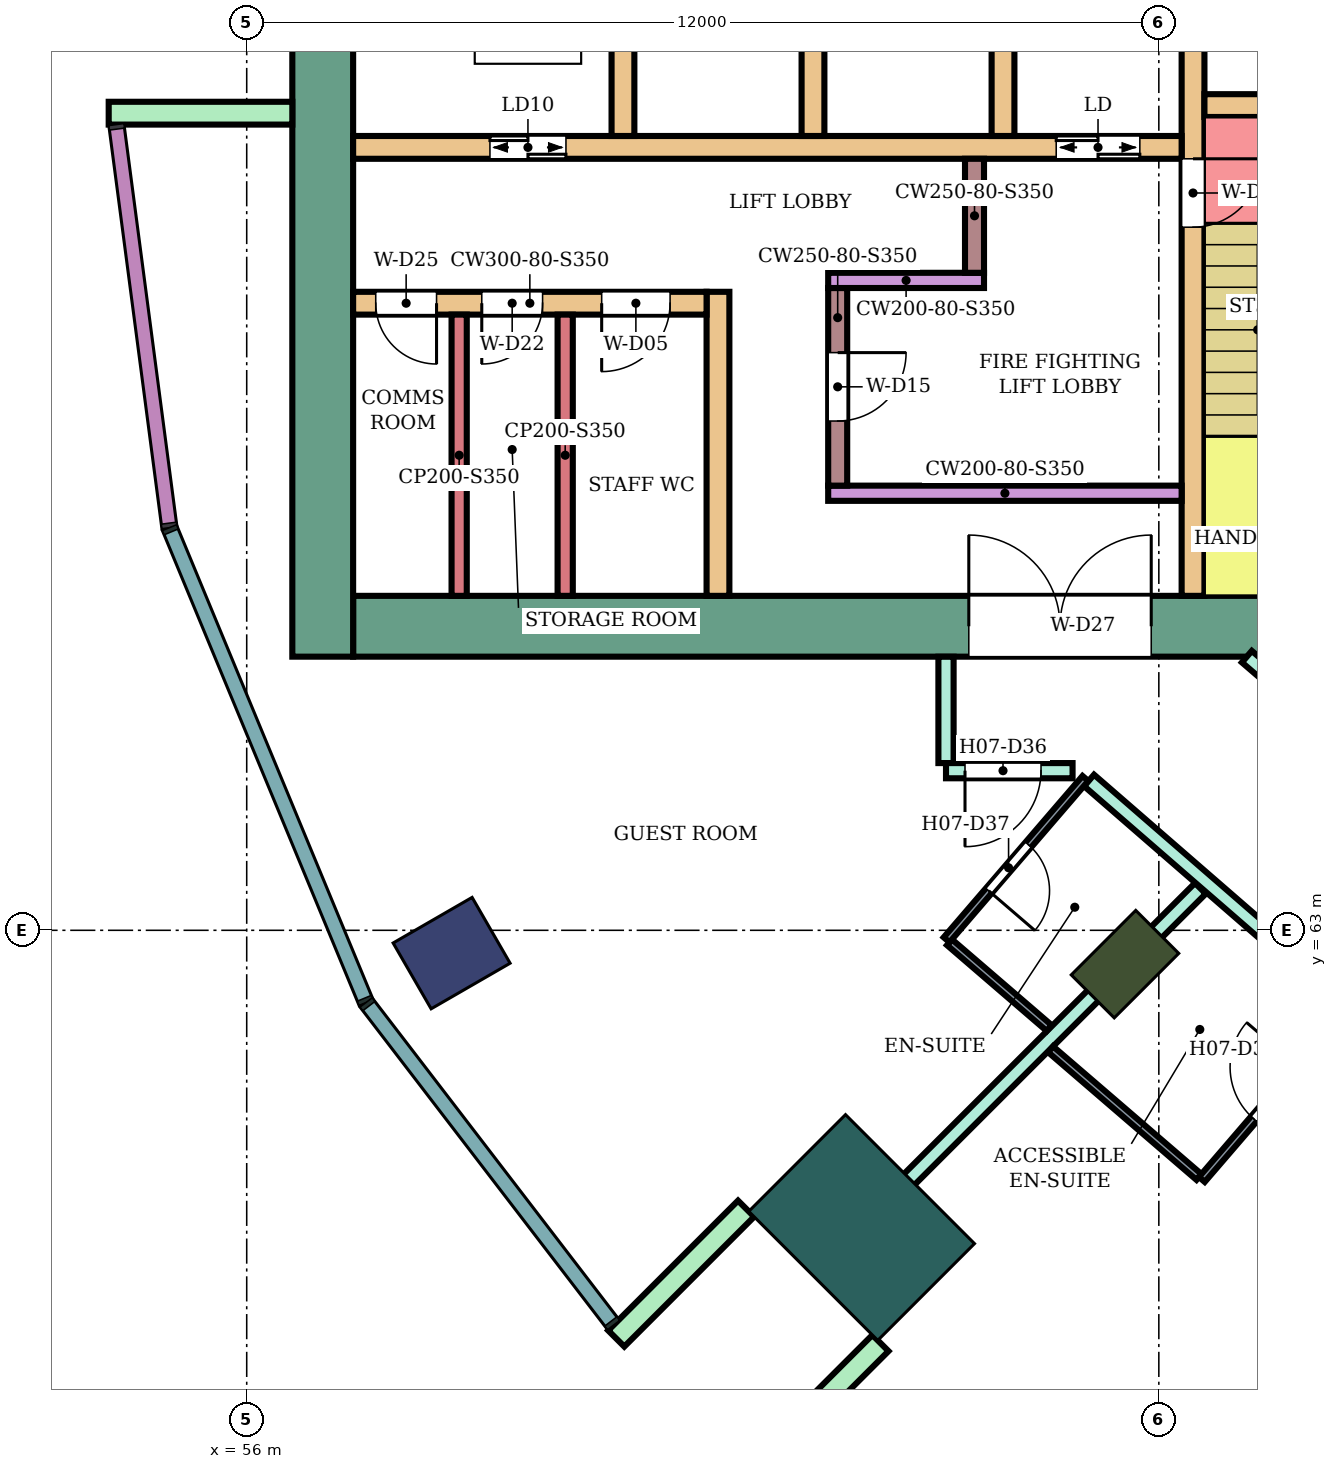
"""IFC4 building model, lengths in metres.
Left out: names, types, materials, properties, quantities, classifications, styles, units other than length and angle.
Written with IfcOpenShell. Run it as: python <this file> out.ifc"""

import sys

from ifc_helpers import new_model, si_unit, direction, frame, frame_2d, origin, origin_2d, place, context, subcontext, project, spatial, rectangle, extrude, element, fill, save


model = new_model("IFC4")
c1 = context("Model", 3, precision=1e-05, world=origin(), true_north=direction((0.0, 1.0)))
c2 = subcontext(c1, "Body", "Model", "MODEL_VIEW")
j1 = project(units=[si_unit("LENGTHUNIT", "METRE"), si_unit("PLANEANGLEUNIT", "RADIAN")], contexts=[c1])
p1 = place(None, origin())
s1 = spatial("IfcSite", under=j1, at=p1, CompositionType="ELEMENT")
p2 = place(p1, origin())
s2 = spatial("IfcBuilding", under=s1, at=p2, CompositionType="ELEMENT")
p3 = place(p2, frame((0.0, 0.0, 105.2)))
s3 = spatial("IfcBuildingStorey", under=s2, at=p3, CompositionType="ELEMENT", Elevation=105.2)
p4 = place(p3, frame((58.696, 62.7, 0.0), z_axis=(0.0, 0.0, 1.0), x_axis=(-0.866025403784, -0.5, 0.0)))
e1 = element("IfcColumn", 1, at=p4, inside=s3, PredefinedType="COLUMN", context=c2, shape_type="SweptSolid", body=[
    extrude(rectangle(XDim=1.2, YDim=1.0, at=origin_2d()), origin(), (0.0, 0.0, 1.0), 3.8),
])
p5 = place(p3, frame((67.555, 62.555, 0.0), z_axis=(0.0, 0.0, 1.0), x_axis=(-0.707106781187, -0.707106781187, 0.0)))
e2 = element("IfcColumn", 2, at=p5, inside=s3, PredefinedType="COLUMN", context=c2, shape_type="SweptSolid", body=[
    extrude(rectangle(XDim=1.2, YDim=0.8, at=origin_2d()), origin(), (0.0, 0.0, 1.0), 3.8),
])
p6 = place(p3, frame((64.09, 59.09, 0.0), z_axis=(0.0, 0.0, 1.0), x_axis=(-0.707106781187, -0.707106781187, 0.0)))
e3 = element("IfcColumn", 3, at=p6, inside=s3, PredefinedType="COLUMN", context=c2, shape_type="SweptSolid", body=[
    extrude(rectangle(XDim=1.8, YDim=2.4, at=origin_2d()), origin(), (0.0, 0.0, 1.0), 3.8),
])
p7 = place(p3, frame((72.1, 67.0, 0.0), z_axis=(0.0, 0.0, 1.0), x_axis=(-1.0, 0.0, 0.0)))
e4 = element("IfcWall", 4, at=p7, inside=s3, PredefinedType="SHEAR", context=c2, shape_type="SweptSolid", body=[
    extrude(rectangle(XDim=14.7, YDim=0.8, at=frame_2d((7.35, 0.0))), origin(), (0.0, 0.0, 1.0), 3.45),
])
p8 = place(p7, frame((4.2, 0.0, 0.0)))
e5 = element("IfcOpeningElement", 5, at=p8, cuts=e4, PredefinedType="OPENING", context=c2, shape_type="SweptSolid", body=[
    extrude(rectangle(XDim=2.4, YDim=2.4, at=frame_2d((1.2, 1.2))), frame((0.0, 0.41, 0.0), z_axis=(0.0, -1.0, 0.0), x_axis=(1.0, 0.0, 0.0)), (0.0, 0.0, 1.0), 0.82),
])
p9 = place(p3, frame((57.0, 83.4, 0.0), z_axis=(0.0, 0.0, 1.0), x_axis=(0.0, -1.0, 0.0)))
e6 = element("IfcWall", 6, at=p9, inside=s3, PredefinedType="SHEAR", context=c2, shape_type="SweptSolid", body=[
    extrude(rectangle(XDim=16.8, YDim=0.8, at=frame_2d((8.4, 0.0))), origin(), (0.0, 0.0, 1.0), 3.45),
])
p10 = place(p3, frame((68.45, 75.0, 0.0), z_axis=(0.0, 0.0, 1.0), x_axis=(0.0, -1.0, 0.0)))
e7 = element("IfcWall", 7, at=p10, inside=s3, PredefinedType="SHEAR", context=c2, shape_type="SweptSolid", body=[
    extrude(rectangle(XDim=7.6, YDim=0.3, at=frame_2d((3.8, 0.0))), origin(), (0.0, 0.0, 1.0), 3.45),
])
p11 = place(p10, frame((1.85, 0.0, 0.0)))
e8 = element("IfcOpeningElement", 8, at=p11, cuts=e7, PredefinedType="OPENING", context=c2, shape_type="SweptSolid", body=[
    extrude(rectangle(XDim=0.9, YDim=2.1, at=frame_2d((0.45, 1.05))), frame((0.0, 0.16, 0.0), z_axis=(0.0, -1.0, 0.0), x_axis=(1.0, 0.0, 0.0)), (0.0, 0.0, 1.0), 0.32),
])
p12 = place(p3, frame((71.65, 73.85, 0.0), z_axis=(0.0, 0.0, 1.0), x_axis=(-1.0, 0.0, 0.0)))
e9 = element("IfcWall", 9, at=p12, inside=s3, PredefinedType="SHEAR", context=c2, shape_type="SweptSolid", body=[
    extrude(rectangle(XDim=3.05, YDim=0.3, at=frame_2d((1.525, 0.0))), origin(), (0.0, 0.0, 1.0), 3.45),
])
p13 = place(p12, frame((1.1, 0.0, 0.0)))
e10 = element("IfcOpeningElement", 10, at=p13, cuts=e9, PredefinedType="OPENING", context=c2, shape_type="SweptSolid", body=[
    extrude(rectangle(XDim=0.7, YDim=2.0, at=frame_2d((0.35, 1.0))), frame((0.0, 0.16, 0.0), z_axis=(0.0, -1.0, 0.0), x_axis=(1.0, 0.0, 0.0)), (0.0, 0.0, 1.0), 0.32),
])
p14 = place(p3, frame((68.3, 73.3, 0.0), z_axis=(0.0, 0.0, 1.0), x_axis=(-1.0, 0.0, 0.0)))
e11 = element("IfcWall", 11, at=p14, inside=s3, PredefinedType="SHEAR", context=c2, shape_type="SweptSolid", body=[
    extrude(rectangle(XDim=10.9, YDim=0.3, at=frame_2d((5.45, 0.0))), origin(), (0.0, 0.0, 1.0), 3.45),
])
p15 = place(p14, frame((0.55, 0.0, 0.0)))
e12 = element("IfcOpeningElement", 12, at=p15, cuts=e11, PredefinedType="OPENING", context=c2, shape_type="SweptSolid", body=[
    extrude(rectangle(XDim=1.1, YDim=2.1, at=frame_2d((0.55, 1.05))), frame((0.0, 0.16, 0.0), z_axis=(0.0, -1.0, 0.0), x_axis=(1.0, 0.0, 0.0)), (0.0, 0.0, 1.0), 0.32),
])
p16 = place(p14, frame((8.1, 0.0, 0.0)))
e13 = element("IfcOpeningElement", 13, at=p16, cuts=e11, PredefinedType="OPENING", context=c2, shape_type="SweptSolid", body=[
    extrude(rectangle(XDim=1.0, YDim=2.1, at=frame_2d((0.5, 1.05))), frame((0.0, 0.16, 0.0), z_axis=(0.0, -1.0, 0.0), x_axis=(1.0, 0.0, 0.0)), (0.0, 0.0, 1.0), 0.32),
])
for number, where, z_axis, x_axis in (
    (14, (65.95, 76.0, 0.0), (0.0, 0.0, 1.0), (0.0, -1.0, 0.0)),
    (15, (63.45, 76.0, 0.0), (0.0, 0.0, 1.0), (0.0, -1.0, 0.0)),
    (16, (60.95, 76.0, 0.0), (0.0, 0.0, 1.0), (0.0, -1.0, 0.0)),
):
    element("IfcWall", number, at=place(p3, frame(where, z_axis=z_axis, x_axis=x_axis)), inside=s3, PredefinedType="SHEAR", context=c2, shape_type="SweptSolid", body=[
        extrude(rectangle(XDim=2.55, YDim=0.3, at=frame_2d((1.275, 0.0))), origin(), (0.0, 0.0, 1.0), 3.45),
    ])
p17 = place(p3, frame((68.3, 68.75, 0.0), z_axis=(0.0, 0.0, 1.0), x_axis=(-1.0, 0.0, 0.0)))
e17 = element("IfcWall", 17, at=p17, inside=s3, PredefinedType="SHEAR", context=c2, shape_type="SweptSolid", body=[
    extrude(rectangle(XDim=4.65, YDim=0.2, at=frame_2d((2.325, 0.0))), origin(), (0.0, 0.0, 1.0), 3.45),
])
p18 = place(p3, frame((63.775, 71.45, 0.0), z_axis=(0.0, 0.0, 1.0), x_axis=(0.0, -1.0, 0.0)))
e18 = element("IfcWall", 18, at=p18, inside=s3, PredefinedType="SHEAR", context=c2, shape_type="SweptSolid", body=[
    extrude(rectangle(XDim=2.6, YDim=0.25, at=frame_2d((1.3, 0.0))), origin(), (0.0, 0.0, 1.0), 3.45),
])
p19 = place(p18, frame((0.85, 0.0, 0.0)))
e19 = element("IfcOpeningElement", 19, at=p19, cuts=e18, PredefinedType="OPENING", context=c2, shape_type="SweptSolid", body=[
    extrude(rectangle(XDim=0.9, YDim=2.1, at=frame_2d((0.45, 1.05))), frame((0.0, 0.135, 0.0), z_axis=(0.0, -1.0, 0.0), x_axis=(1.0, 0.0, 0.0)), (0.0, 0.0, 1.0), 0.27),
])
p20 = place(p3, frame((65.7, 71.55, 0.0), z_axis=(0.0, 0.0, 1.0), x_axis=(-1.0, 0.0, 0.0)))
e20 = element("IfcWall", 20, at=p20, inside=s3, PredefinedType="SHEAR", context=c2, shape_type="SweptSolid", body=[
    extrude(rectangle(XDim=2.05, YDim=0.2, at=frame_2d((1.025, 0.0))), origin(), (0.0, 0.0, 1.0), 3.45),
])
p21 = place(p3, frame((65.575, 73.15, 0.0), z_axis=(0.0, 0.0, 1.0), x_axis=(0.0, -1.0, 0.0)))
e21 = element("IfcWall", 21, at=p21, inside=s3, PredefinedType="SHEAR", context=c2, shape_type="SweptSolid", body=[
    extrude(rectangle(XDim=1.5, YDim=0.25, at=frame_2d((0.75, 0.0))), origin(), (0.0, 0.0, 1.0), 3.45),
])
p22 = place(p3, frame((62.2, 71.4, 0.0), z_axis=(0.0, 0.0, 1.0), x_axis=(0.0, -1.0, 0.0)))
e22 = element("IfcWall", 22, at=p22, inside=s3, PredefinedType="SHEAR", context=c2, shape_type="SweptSolid", body=[
    extrude(rectangle(XDim=4.0, YDim=0.3, at=frame_2d((2.0, 0.0))), origin(), (0.0, 0.0, 1.0), 3.45),
])
p23 = place(p3, frame((62.05, 71.25, 0.0), z_axis=(0.0, 0.0, 1.0), x_axis=(-1.0, 0.0, 0.0)))
e23 = element("IfcWall", 23, at=p23, inside=s3, PredefinedType="SHEAR", context=c2, shape_type="SweptSolid", body=[
    extrude(rectangle(XDim=4.65, YDim=0.3, at=frame_2d((2.325, 0.0))), origin(), (0.0, 0.0, 1.0), 3.45),
])
p24 = place(p23, frame((0.48, 0.0, 0.0)))
e24 = element("IfcOpeningElement", 24, at=p24, cuts=e23, PredefinedType="OPENING", context=c2, shape_type="SweptSolid", body=[
    extrude(rectangle(XDim=0.9, YDim=2.1, at=frame_2d((0.45, 1.05))), frame((0.0, 0.16, 0.0), z_axis=(0.0, -1.0, 0.0), x_axis=(1.0, 0.0, 0.0)), (0.0, 0.0, 1.0), 0.32),
])
p25 = place(p23, frame((2.157, 0.0, 0.0)))
e25 = element("IfcOpeningElement", 25, at=p25, cuts=e23, PredefinedType="OPENING", context=c2, shape_type="SweptSolid", body=[
    extrude(rectangle(XDim=0.8, YDim=2.1, at=frame_2d((0.4, 1.05))), frame((0.0, 0.16, 0.0), z_axis=(0.0, -1.0, 0.0), x_axis=(1.0, 0.0, 0.0)), (0.0, 0.0, 1.0), 0.32),
])
p26 = place(p23, frame((3.552, 0.0, 0.0)))
e26 = element("IfcOpeningElement", 26, at=p26, cuts=e23, PredefinedType="OPENING", context=c2, shape_type="SweptSolid", body=[
    extrude(rectangle(XDim=0.8, YDim=2.1, at=frame_2d((0.4, 1.05))), frame((0.0, 0.16, 0.0), z_axis=(0.0, -1.0, 0.0), x_axis=(1.0, 0.0, 0.0)), (0.0, 0.0, 1.0), 0.32),
])
for number, where, z_axis, x_axis in (
    (27, (56.6, 73.75, 0.0), (0.0, 0.0, 1.0), (-1.0, 0.0, 0.0)),
    (28, (62.57, 59.338, 0.0), (0.0, 0.0, 1.0), (-0.707, -0.707, 0.0)),
    (29, (64.338, 57.57, 0.0), (0.0, 0.0, 1.0), (-0.707, -0.707, 0.0)),
):
    element("IfcWall", number, at=place(p3, frame(where, z_axis=z_axis, x_axis=x_axis)), inside=s3, PredefinedType="NOTDEFINED", context=c2, shape_type="SweptSolid", body=[
        extrude(rectangle(XDim=2.416, YDim=0.3, at=frame_2d((1.208, 0.0))), origin(), (0.0, 0.0, 1.0), 3.8),
    ])
p27 = place(p3, frame((63.592, 58.599, 0.0), z_axis=(0.0, 0.0, 1.0), x_axis=(0.707281009781, 0.706932509653, 0.0)))
e30 = element("IfcWall", 30, at=p27, inside=s3, PredefinedType="PARTITIONING", context=c2, shape_type="SweptSolid", body=[
    extrude(rectangle(XDim=7.005, YDim=0.2, at=frame_2d((3.503, 0.0))), origin(), (0.0, 0.0, 1.0), 3.35),
])
p28 = place(p3, frame((65.2, 65.2, 0.0), z_axis=(0.0, 0.0, 1.0), x_axis=(0.0, 1.0, 0.0)))
e31 = element("IfcWall", 31, at=p28, inside=s3, PredefinedType="PARTITIONING", context=c2, shape_type="SweptSolid", body=[
    extrude(rectangle(XDim=1.399, YDim=0.2, at=frame_2d((0.7, 0.0))), origin(), (0.0, 0.0, 1.0), 3.35),
])
p29 = place(p3, frame((65.2, 65.1, 0.0), z_axis=(0.0, 0.0, 1.0), x_axis=(1.0, 0.0, 0.0)))
e32 = element("IfcWall", 32, at=p29, inside=s3, PredefinedType="PARTITIONING", context=c2, shape_type="SweptSolid", body=[
    extrude(rectangle(XDim=1.665, YDim=0.2, at=frame_2d((0.833, 0.0))), origin(), (0.0, 0.0, 1.0), 3.35),
])
p30 = place(p29, frame((0.25, 0.0, 0.0)))
e33 = element("IfcOpeningElement", 33, at=p30, cuts=e32, PredefinedType="OPENING", context=c2, shape_type="SweptSolid", body=[
    extrude(rectangle(XDim=1.0, YDim=2.1, at=frame_2d((0.5, 1.05))), frame((0.0, 0.11, 0.0), z_axis=(0.0, -1.0, 0.0), x_axis=(1.0, 0.0, 0.0)), (0.0, 0.0, 1.0), 0.22),
])
p31 = place(p3, frame((67.082, 64.972, 0.0), z_axis=(0.0, 0.0, 1.0), x_axis=(0.755033632617, -0.655686063309, 0.0)))
e34 = element("IfcWall", 34, at=p31, inside=s3, PredefinedType="PARTITIONING", context=c2, shape_type="SweptSolid", body=[
    extrude(rectangle(XDim=6.185, YDim=0.2, at=frame_2d((3.093, 0.0))), origin(), (0.0, 0.0, 1.0), 3.35),
])
p32 = place(p31, frame((4.778, 0.0, 0.0)))
e35 = element("IfcOpeningElement", 35, at=p32, cuts=e34, PredefinedType="OPENING", context=c2, shape_type="SweptSolid", body=[
    extrude(rectangle(XDim=1.1, YDim=2.1, at=frame_2d((0.55, 1.05))), frame((0.0, 0.11, 0.0), z_axis=(0.0, -1.0, 0.0), x_axis=(1.0, 0.0, 0.0)), (0.0, 0.0, 1.0), 0.22),
])
p33 = place(p3, frame((67.094, 52.663, 0.0), z_axis=(0.0, 0.0, 1.0), x_axis=(0.500236379769, 0.865888886841, 0.0)))
e36 = element("IfcWall", 36, at=p33, inside=s3, PredefinedType="PARTITIONING", context=c2, shape_type="SweptSolid", body=[
    extrude(rectangle(XDim=9.375, YDim=0.2, at=frame_2d((4.688, 0.0))), origin(), (0.0, 0.0, 1.0), 3.35),
])
p34 = place(p3, frame((69.158, 66.6, 0.0), z_axis=(0.0, 0.0, 1.0), x_axis=(0.757976058094, -0.652282373943, 0.0)))
e37 = element("IfcWall", 37, at=p34, inside=s3, PredefinedType="PARTITIONING", context=c2, shape_type="SweptSolid", body=[
    extrude(rectangle(XDim=5.16, YDim=0.2, at=frame_2d((2.58, 0.0))), origin(), (0.0, 0.0, 1.0), 3.35),
])
p35 = place(p34, frame((1.6, 0.0, 0.0)))
e38 = element("IfcOpeningElement", 38, at=p35, cuts=e37, PredefinedType="OPENING", context=c2, shape_type="SweptSolid", body=[
    extrude(rectangle(XDim=1.0, YDim=2.1, at=frame_2d((0.5, 1.05))), frame((0.0, 0.11, 0.0), z_axis=(0.0, -1.0, 0.0), x_axis=(1.0, 0.0, 0.0)), (0.0, 0.0, 1.0), 0.22),
])
p36 = place(p3, frame((65.246, 62.842, 0.0), z_axis=(0.0, 0.0, 1.0), x_axis=(0.758030338995, -0.652219292234, 0.0)))
e39 = element("IfcWall", 39, at=p36, inside=s3, PredefinedType="PARTITIONING", context=c2, shape_type="SweptSolid", body=[
    extrude(rectangle(XDim=1.73, YDim=0.1, at=frame_2d((0.865, 0.0))), origin(), (0.0, 0.0, 1.0), 3.35),
])
p37 = place(p3, frame((65.208, 62.875, 0.0), z_axis=(0.0, 0.0, 1.0), x_axis=(0.65205430601, 0.758172264076, 0.0)))
e40 = element("IfcWall", 40, at=p37, inside=s3, PredefinedType="PARTITIONING", context=c2, shape_type="SweptSolid", body=[
    extrude(rectangle(XDim=2.8, YDim=0.1, at=frame_2d((1.4, 0.0))), origin(), (0.0, 0.0, 1.0), 3.35),
])
p38 = place(p37, frame((0.85, 0.0, 0.0)))
e41 = element("IfcOpeningElement", 41, at=p38, cuts=e40, PredefinedType="OPENING", context=c2, shape_type="SweptSolid", body=[
    extrude(rectangle(XDim=0.8, YDim=2.1, at=frame_2d((0.4, 1.05))), frame((0.0, 0.06, 0.0), z_axis=(0.0, -1.0, 0.0), x_axis=(1.0, 0.0, 0.0)), (0.0, 0.0, 1.0), 0.12),
])
p39 = place(p3, frame((66.576, 61.435, 0.0), z_axis=(0.0, 0.0, 1.0), x_axis=(0.757970550281, -0.652288774169, 0.0)))
e42 = element("IfcWall", 42, at=p39, inside=s3, PredefinedType="PARTITIONING", context=c2, shape_type="SweptSolid", body=[
    extrude(rectangle(XDim=2.576, YDim=0.1, at=frame_2d((1.288, 0.0))), origin(), (0.0, 0.0, 1.0), 3.35),
])
p40 = place(p3, frame((68.566, 59.722, 0.0), z_axis=(0.0, 0.0, 1.0), x_axis=(0.65193146671, 0.758277892803, 0.0)))
e43 = element("IfcWall", 43, at=p40, inside=s3, PredefinedType="PARTITIONING", context=c2, shape_type="SweptSolid", body=[
    extrude(rectangle(XDim=2.89, YDim=0.1, at=frame_2d((1.445, 0.0))), origin(), (0.0, 0.0, 1.0), 3.35),
])
p41 = place(p40, frame((1.05, 0.0, 0.0)))
e44 = element("IfcOpeningElement", 44, at=p41, cuts=e43, PredefinedType="OPENING", context=c2, shape_type="SweptSolid", body=[
    extrude(rectangle(XDim=0.9, YDim=2.1, at=frame_2d((0.45, 1.05))), frame((0.0, 0.06, 0.0), z_axis=(0.0, -1.0, 0.0), x_axis=(1.0, 0.0, 0.0)), (0.0, 0.0, 1.0), 0.12),
])
for number, where, z_axis, x_axis in (
    (45, (60.19, 71.1, 0.0), (0.0, 0.0, 1.0), (0.0, -1.0, 0.0)),
    (46, (58.795, 71.1, 0.0), (0.0, 0.0, 1.0), (0.0, -1.0, 0.0)),
):
    element("IfcWall", number, at=place(p3, frame(where, z_axis=z_axis, x_axis=x_axis)), inside=s3, PredefinedType="PARTITIONING", context=c2, shape_type="SweptSolid", body=[
        extrude(rectangle(XDim=3.7, YDim=0.2, at=frame_2d((1.85, 0.0))), origin(), (0.0, 0.0, 1.0), 3.45),
    ])
p42 = place(p41, origin())
e47 = element("IfcDoor", 47, at=p42, inside=s3, OperationType="SINGLE_SWING_RIGHT", PredefinedType="DOOR", context=c2, shape_type="SweptSolid", body=[
    extrude(rectangle(XDim=0.9, YDim=2.1, at=frame_2d((0.45, 1.05))), frame((0.0, 0.025, 0.0), z_axis=(0.0, -1.0, 0.0), x_axis=(1.0, 0.0, 0.0)), (0.0, 0.0, 1.0), 0.05),
])
fill(e44, e47)
p43 = place(p30, frame((1.0, 0.0, 0.0), z_axis=(0.0, 0.0, 1.0), x_axis=(-1.0, 0.0, 0.0)))
e48 = element("IfcDoor", 48, at=p43, inside=s3, OperationType="SINGLE_SWING_RIGHT", PredefinedType="DOOR", context=c2, shape_type="SweptSolid", body=[
    extrude(rectangle(XDim=1.0, YDim=2.1, at=frame_2d((0.5, 1.05))), frame((0.0, 0.025, 0.0), z_axis=(0.0, -1.0, 0.0), x_axis=(1.0, 0.0, 0.0)), (0.0, 0.0, 1.0), 0.05),
])
fill(e33, e48)
p44 = place(p38, frame((0.8, 0.0, 0.0), z_axis=(0.0, 0.0, 1.0), x_axis=(-1.0, 0.0, 0.0)))
e49 = element("IfcDoor", 49, at=p44, inside=s3, OperationType="SINGLE_SWING_RIGHT", PredefinedType="DOOR", context=c2, shape_type="SweptSolid", body=[
    extrude(rectangle(XDim=0.8, YDim=2.1, at=frame_2d((0.4, 1.05))), frame((0.0, 0.025, 0.0), z_axis=(0.0, -1.0, 0.0), x_axis=(1.0, 0.0, 0.0)), (0.0, 0.0, 1.0), 0.05),
])
fill(e41, e49)
p45 = place(p11, origin())
e50 = element("IfcDoor", 50, at=p45, inside=s3, OperationType="SINGLE_SWING_LEFT", PredefinedType="DOOR", context=c2, shape_type="SweptSolid", body=[
    extrude(rectangle(XDim=0.9, YDim=2.1, at=frame_2d((0.45, 1.05))), frame((0.0, 0.025, 0.0), z_axis=(0.0, -1.0, 0.0), x_axis=(1.0, 0.0, 0.0)), (0.0, 0.0, 1.0), 0.05),
])
fill(e8, e50)
p46 = place(p15, origin())
e51 = element("IfcDoor", 51, at=p46, inside=s3, OperationType="DOUBLE_DOOR_SLIDING", PredefinedType="DOOR", context=c2, shape_type="SweptSolid", body=[
    extrude(rectangle(XDim=1.1, YDim=2.1, at=frame_2d((0.55, 1.05))), frame((0.0, 0.025, 0.0), z_axis=(0.0, -1.0, 0.0), x_axis=(1.0, 0.0, 0.0)), (0.0, 0.0, 1.0), 0.05),
])
fill(e12, e51)
p47 = place(p16, origin())
e52 = element("IfcDoor", 52, at=p47, inside=s3, OperationType="DOUBLE_DOOR_SLIDING", PredefinedType="DOOR", context=c2, shape_type="SweptSolid", body=[
    extrude(rectangle(XDim=1.0, YDim=2.1, at=frame_2d((0.5, 1.05))), frame((0.0, 0.025, 0.0), z_axis=(0.0, -1.0, 0.0), x_axis=(1.0, 0.0, 0.0)), (0.0, 0.0, 1.0), 0.05),
])
fill(e13, e52)
p48 = place(p19, origin())
e53 = element("IfcDoor", 53, at=p48, inside=s3, OperationType="SINGLE_SWING_LEFT", PredefinedType="DOOR", context=c2, shape_type="SweptSolid", body=[
    extrude(rectangle(XDim=0.9, YDim=2.1, at=frame_2d((0.45, 1.05))), frame((0.0, 0.025, 0.0), z_axis=(0.0, -1.0, 0.0), x_axis=(1.0, 0.0, 0.0)), (0.0, 0.0, 1.0), 0.05),
])
fill(e19, e53)
p49 = place(p24, origin())
e54 = element("IfcDoor", 54, at=p49, inside=s3, OperationType="SINGLE_SWING_RIGHT", PredefinedType="DOOR", context=c2, shape_type="SweptSolid", body=[
    extrude(rectangle(XDim=0.9, YDim=2.1, at=frame_2d((0.45, 1.05))), frame((0.0, 0.025, 0.0), z_axis=(0.0, -1.0, 0.0), x_axis=(1.0, 0.0, 0.0)), (0.0, 0.0, 1.0), 0.05),
])
fill(e24, e54)
p50 = place(p25, origin())
e55 = element("IfcDoor", 55, at=p50, inside=s3, OperationType="SINGLE_SWING_RIGHT", PredefinedType="DOOR", context=c2, shape_type="SweptSolid", body=[
    extrude(rectangle(XDim=0.8, YDim=2.1, at=frame_2d((0.4, 1.05))), frame((0.0, 0.025, 0.0), z_axis=(0.0, -1.0, 0.0), x_axis=(1.0, 0.0, 0.0)), (0.0, 0.0, 1.0), 0.05),
])
fill(e25, e55)
p51 = place(p26, origin())
e56 = element("IfcDoor", 56, at=p51, inside=s3, OperationType="SINGLE_SWING_LEFT", PredefinedType="DOOR", context=c2, shape_type="SweptSolid", body=[
    extrude(rectangle(XDim=0.8, YDim=2.1, at=frame_2d((0.4, 1.05))), frame((0.0, 0.025, 0.0), z_axis=(0.0, -1.0, 0.0), x_axis=(1.0, 0.0, 0.0)), (0.0, 0.0, 1.0), 0.05),
])
fill(e26, e56)
p52 = place(p8, frame((2.4, 0.0, 0.0), z_axis=(0.0, 0.0, 1.0), x_axis=(-1.0, 0.0, 0.0)))
e57 = element("IfcDoor", 57, at=p52, inside=s3, OperationType="DOUBLE_DOOR_SINGLE_SWING", PredefinedType="DOOR", context=c2, shape_type="SweptSolid", body=[
    extrude(rectangle(XDim=2.4, YDim=2.4, at=frame_2d((1.2, 1.2))), frame((0.0, 0.025, 0.0), z_axis=(0.0, -1.0, 0.0), x_axis=(1.0, 0.0, 0.0)), (0.0, 0.0, 1.0), 0.05),
])
fill(e5, e57)
save(model, sys.argv[1])
